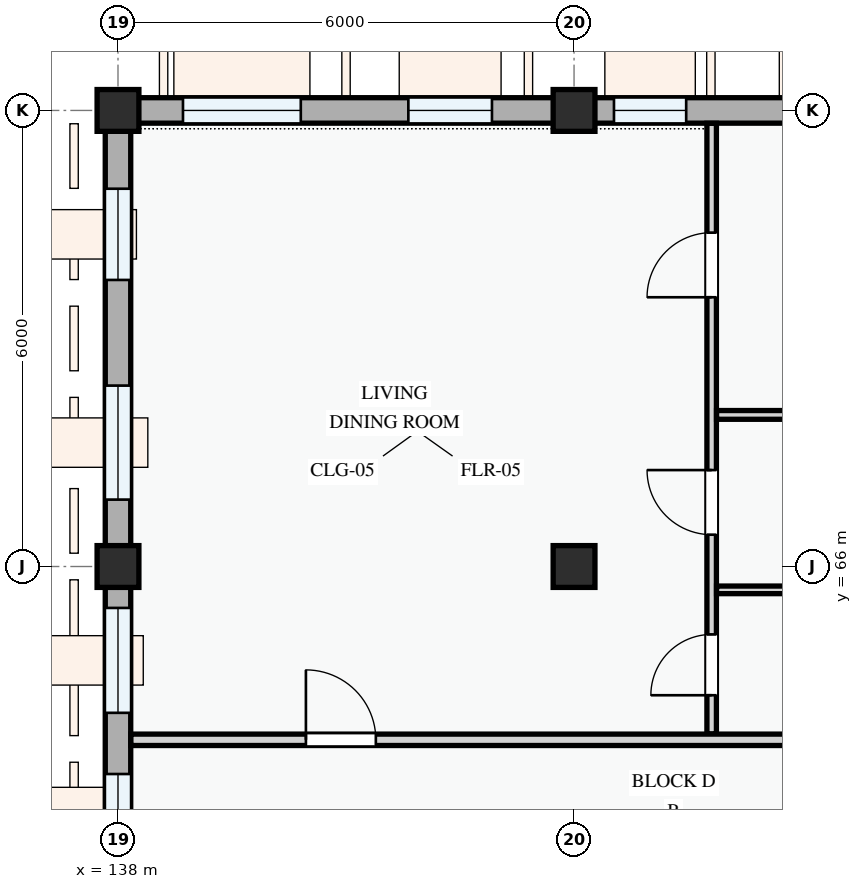
"""IFC4 building model, lengths in metres.
Left out: names, types, materials, properties, quantities, classifications, styles, units other than length and angle.
Written with IfcOpenShell. Run it as: python <this file> out.ifc"""

import sys

from ifc_helpers import new_model, si_unit, direction, frame, frame_2d, origin, origin_2d, place, context, subcontext, project, spatial, rectangle, extrude, element, fill, save


model = new_model("IFC4")
c1 = context("Model", 3, precision=1e-05, world=origin(), true_north=direction((0.0, 1.0)))
c2 = subcontext(c1, "Body", "Model", "MODEL_VIEW")
j1 = project(units=[si_unit("LENGTHUNIT", "METRE"), si_unit("PLANEANGLEUNIT", "RADIAN")], contexts=[c1])
p1 = place(None, origin())
s1 = spatial("IfcSite", under=j1, at=p1, CompositionType="ELEMENT")
p2 = place(p1, origin())
s2 = spatial("IfcBuilding", under=s1, at=p2, CompositionType="ELEMENT")
p3 = place(p2, frame((0.0, 0.0, 8.1)))
s3 = spatial("IfcBuildingStorey", under=s2, at=p3, CompositionType="ELEMENT", Elevation=8.1)
for number, where, z_axis, x_axis in (
    (1, (138.0, 66.0, 0.0), (0.0, 0.0, 1.0), (1.0, 0.0, 0.0)),
    (2, (138.0, 72.0, 0.0), (0.0, 0.0, 1.0), (1.0, 0.0, 0.0)),
    (3, (144.0, 66.0, 0.0), (0.0, 0.0, 1.0), (1.0, 0.0, 0.0)),
    (4, (144.0, 72.0, 0.0), (0.0, 0.0, 1.0), (1.0, 0.0, 0.0)),
):
    element("IfcColumn", number, at=place(p3, frame(where, z_axis=z_axis, x_axis=x_axis)), inside=s3, PredefinedType="COLUMN", context=c2, shape_type="SweptSolid", body=[
        extrude(rectangle(XDim=0.55, YDim=0.55, at=origin_2d()), origin(), (0.0, 0.0, 1.0), 3.3),
    ])
p4 = place(p3, frame((152.4, 72.0, 0.0), z_axis=(0.0, 0.0, 1.0), x_axis=(-1.0, 0.0, 0.0)))
e5 = element("IfcWall", 5, at=p4, inside=s3, PredefinedType="STANDARD", context=c2, shape_type="SweptSolid", body=[
    extrude(rectangle(XDim=8.4, YDim=0.335, at=frame_2d((4.2, 0.0))), origin(), (0.0, 0.0, 1.0), 2.375),
])
p5 = place(p4, frame((1.125, 0.0, 0.78)))
e6 = element("IfcOpeningElement", 6, at=p5, cuts=e5, PredefinedType="OPENING", context=c2, shape_type="SweptSolid", body=[
    extrude(rectangle(XDim=1.4, YDim=1.45, at=frame_2d((0.7, 0.725))), frame((0.0, 0.177, 0.0), z_axis=(0.0, -1.0, 0.0), x_axis=(1.0, 0.0, 0.0)), (0.0, 0.0, 1.0), 0.355),
])
p6 = place(p4, frame((4.33, 0.0, 0.78)))
e7 = element("IfcOpeningElement", 7, at=p6, cuts=e5, PredefinedType="OPENING", context=c2, shape_type="SweptSolid", body=[
    extrude(rectangle(XDim=1.25, YDim=1.45, at=frame_2d((0.625, 0.725))), frame((0.0, 0.177, 0.0), z_axis=(0.0, -1.0, 0.0), x_axis=(1.0, 0.0, 0.0)), (0.0, 0.0, 1.0), 0.355),
])
p7 = place(p4, frame((6.925, 0.0, 0.78)))
e8 = element("IfcOpeningElement", 8, at=p7, cuts=e5, PredefinedType="OPENING", context=c2, shape_type="SweptSolid", body=[
    extrude(rectangle(XDim=0.95, YDim=1.15, at=frame_2d((0.475, 0.575))), frame((0.0, 0.177, 0.0), z_axis=(0.0, -1.0, 0.0), x_axis=(1.0, 0.0, 0.0)), (0.0, 0.0, 1.0), 0.355),
])
p8 = place(p3, frame((144.0, 72.0, 0.0), z_axis=(0.0, 0.0, 1.0), x_axis=(-1.0, 0.0, 0.0)))
e9 = element("IfcWall", 9, at=p8, inside=s3, PredefinedType="STANDARD", context=c2, shape_type="SweptSolid", body=[
    extrude(rectangle(XDim=6.0, YDim=0.335, at=frame_2d((3.0, 0.0))), origin(), (0.0, 0.0, 1.0), 2.475),
])
p9 = place(p8, frame((1.08, 0.0, 0.78)))
e10 = element("IfcOpeningElement", 10, at=p9, cuts=e9, PredefinedType="OPENING", context=c2, shape_type="SweptSolid", body=[
    extrude(rectangle(XDim=1.1, YDim=1.3, at=frame_2d((0.55, 0.65))), frame((0.0, 0.177, 0.0), z_axis=(0.0, -1.0, 0.0), x_axis=(1.0, 0.0, 0.0)), (0.0, 0.0, 1.0), 0.355),
])
p10 = place(p8, frame((3.595, 0.0, 0.78)))
e11 = element("IfcOpeningElement", 11, at=p10, cuts=e9, PredefinedType="OPENING", context=c2, shape_type="SweptSolid", body=[
    extrude(rectangle(XDim=1.55, YDim=1.4, at=frame_2d((0.775, 0.7))), frame((0.0, 0.177, 0.0), z_axis=(0.0, -1.0, 0.0), x_axis=(1.0, 0.0, 0.0)), (0.0, 0.0, 1.0), 0.355),
])
p11 = place(p3, frame((138.0, 72.0, 0.0), z_axis=(0.0, 0.0, 1.0), x_axis=(0.0, -1.0, 0.0)))
e12 = element("IfcWall", 12, at=p11, inside=s3, PredefinedType="STANDARD", context=c2, shape_type="SweptSolid", body=[
    extrude(rectangle(XDim=6.0, YDim=0.335, at=frame_2d((3.0, 0.0))), origin(), (0.0, 0.0, 1.0), 2.575),
])
p12 = place(p11, frame((1.03, 0.0, 0.78)))
e13 = element("IfcOpeningElement", 13, at=p12, cuts=e12, PredefinedType="OPENING", context=c2, shape_type="SweptSolid", body=[
    extrude(rectangle(XDim=1.2, YDim=1.35, at=frame_2d((0.6, 0.675))), frame((0.0, 0.177, 0.0), z_axis=(0.0, -1.0, 0.0), x_axis=(1.0, 0.0, 0.0)), (0.0, 0.0, 1.0), 0.355),
])
p13 = place(p11, frame((3.62, 0.0, 0.78)))
e14 = element("IfcOpeningElement", 14, at=p13, cuts=e12, PredefinedType="OPENING", context=c2, shape_type="SweptSolid", body=[
    extrude(rectangle(XDim=1.5, YDim=1.65, at=frame_2d((0.75, 0.825))), frame((0.0, 0.177, 0.0), z_axis=(0.0, -1.0, 0.0), x_axis=(1.0, 0.0, 0.0)), (0.0, 0.0, 1.0), 0.355),
])
p14 = place(p3, frame((138.0, 66.0, 0.0), z_axis=(0.0, 0.0, 1.0), x_axis=(0.0, -1.0, 0.0)))
e15 = element("IfcWall", 15, at=p14, inside=s3, PredefinedType="STANDARD", context=c2, shape_type="SweptSolid", body=[
    extrude(rectangle(XDim=8.4, YDim=0.335, at=frame_2d((4.2, 0.0))), origin(), (0.0, 0.0, 1.0), 2.425),
])
p15 = place(p14, frame((0.545, 0.0, 0.78)))
e16 = element("IfcOpeningElement", 16, at=p15, cuts=e15, PredefinedType="OPENING", context=c2, shape_type="SweptSolid", body=[
    extrude(rectangle(XDim=1.38, YDim=1.48, at=frame_2d((0.69, 0.74))), frame((0.0, 0.177, 0.0), z_axis=(0.0, -1.0, 0.0), x_axis=(1.0, 0.0, 0.0)), (0.0, 0.0, 1.0), 0.355),
])
p16 = place(p14, frame((2.73, 0.0, 0.78)))
e17 = element("IfcOpeningElement", 17, at=p16, cuts=e15, PredefinedType="OPENING", context=c2, shape_type="SweptSolid", body=[
    extrude(rectangle(XDim=1.0, YDim=1.25, at=frame_2d((0.5, 0.625))), frame((0.0, 0.177, 0.0), z_axis=(0.0, -1.0, 0.0), x_axis=(1.0, 0.0, 0.0)), (0.0, 0.0, 1.0), 0.355),
])
p17 = place(p14, frame((5.175, 0.0, 0.78)))
e18 = element("IfcOpeningElement", 18, at=p17, cuts=e15, PredefinedType="OPENING", context=c2, shape_type="SweptSolid", body=[
    extrude(rectangle(XDim=2.04, YDim=1.46, at=frame_2d((1.02, 0.73))), frame((0.0, 0.177, 0.0), z_axis=(0.0, -1.0, 0.0), x_axis=(1.0, 0.0, 0.0)), (0.0, 0.0, 1.0), 0.355),
])
p18 = place(p3, frame((145.81, 63.797, 0.0), z_axis=(0.0, 0.0, 1.0), x_axis=(0.0, 1.0, 0.0)))
e19 = element("IfcWall", 19, at=p18, inside=s3, PredefinedType="PARTITIONING", context=c2, shape_type="SweptSolid", body=[
    extrude(rectangle(XDim=8.033, YDim=0.125, at=frame_2d((4.017, 0.0))), origin(), (0.0, 0.0, 1.0), 3.0),
])
p19 = place(p18, frame((0.51, 0.0, 0.0)))
e20 = element("IfcOpeningElement", 20, at=p19, cuts=e19, PredefinedType="OPENING", context=c2, shape_type="SweptSolid", body=[
    extrude(rectangle(XDim=0.8, YDim=2.1, at=frame_2d((0.4, 1.05))), frame((0.0, 0.073, 0.0), z_axis=(0.0, -1.0, 0.0), x_axis=(1.0, 0.0, 0.0)), (0.0, 0.0, 1.0), 0.145),
])
p20 = place(p18, frame((2.622, 0.0, 0.0)))
e21 = element("IfcOpeningElement", 21, at=p20, cuts=e19, PredefinedType="OPENING", context=c2, shape_type="SweptSolid", body=[
    extrude(rectangle(XDim=0.85, YDim=2.1, at=frame_2d((0.425, 1.05))), frame((0.0, 0.073, 0.0), z_axis=(0.0, -1.0, 0.0), x_axis=(1.0, 0.0, 0.0)), (0.0, 0.0, 1.0), 0.145),
])
p21 = place(p18, frame((5.745, 0.0, 0.0)))
e22 = element("IfcOpeningElement", 22, at=p21, cuts=e19, PredefinedType="OPENING", context=c2, shape_type="SweptSolid", body=[
    extrude(rectangle(XDim=0.85, YDim=2.1, at=frame_2d((0.425, 1.05))), frame((0.0, 0.073, 0.0), z_axis=(0.0, -1.0, 0.0), x_axis=(1.0, 0.0, 0.0)), (0.0, 0.0, 1.0), 0.145),
])
p22 = place(p3, frame((145.875, 67.994, 0.0), z_axis=(0.0, 0.0, 1.0), x_axis=(1.0, 0.0, 0.0)))
e23 = element("IfcWall", 23, at=p22, inside=s3, PredefinedType="PARTITIONING", context=c2, shape_type="SweptSolid", body=[
    extrude(rectangle(XDim=6.563, YDim=0.115, at=frame_2d((3.281, 0.0))), origin(), (0.0, 0.0, 1.0), 3.0),
])
p23 = place(p3, frame((145.875, 65.693, 0.0), z_axis=(0.0, 0.0, 1.0), x_axis=(1.0, 0.0, 0.0)))
e24 = element("IfcWall", 24, at=p23, inside=s3, PredefinedType="PARTITIONING", context=c2, shape_type="SweptSolid", body=[
    extrude(rectangle(XDim=6.563, YDim=0.1, at=frame_2d((3.281, 0.0))), origin(), (0.0, 0.0, 1.0), 2.375),
])
p24 = place(p3, frame((138.169, 63.72, 0.0), z_axis=(0.0, 0.0, 1.0), x_axis=(1.0, 0.0, 0.0)))
e25 = element("IfcWall", 25, at=p24, inside=s3, PredefinedType="PARTITIONING", context=c2, shape_type="SweptSolid", body=[
    extrude(rectangle(XDim=14.371, YDim=0.15, at=frame_2d((7.185, 0.0))), origin(), (0.0, 0.0, 1.0), 3.0),
])
p25 = place(p24, frame((2.303, 0.0, 0.0)))
e26 = element("IfcOpeningElement", 26, at=p25, cuts=e25, PredefinedType="OPENING", context=c2, shape_type="SweptSolid", body=[
    extrude(rectangle(XDim=0.92, YDim=2.1, at=frame_2d((0.46, 1.05))), frame((0.0, 0.085, 0.0), z_axis=(0.0, -1.0, 0.0), x_axis=(1.0, 0.0, 0.0)), (0.0, 0.0, 1.0), 0.17),
])
p26 = place(p7, origin())
e27 = element("IfcWindow", 27, at=p26, inside=s3, PartitioningType="SINGLE_PANEL", PredefinedType="WINDOW", context=c2, shape_type="SweptSolid", body=[
    extrude(rectangle(XDim=0.95, YDim=1.15, at=frame_2d((0.475, 0.575))), frame((0.0, 0.03, 0.0), z_axis=(0.0, -1.0, 0.0), x_axis=(1.0, 0.0, 0.0)), (0.0, 0.0, 1.0), 0.06),
])
fill(e8, e27)
p27 = place(p9, origin())
e28 = element("IfcWindow", 28, at=p27, inside=s3, PartitioningType="SINGLE_PANEL", PredefinedType="WINDOW", context=c2, shape_type="SweptSolid", body=[
    extrude(rectangle(XDim=1.1, YDim=1.3, at=frame_2d((0.55, 0.65))), frame((0.0, 0.03, 0.0), z_axis=(0.0, -1.0, 0.0), x_axis=(1.0, 0.0, 0.0)), (0.0, 0.0, 1.0), 0.06),
])
fill(e10, e28)
p28 = place(p10, origin())
e29 = element("IfcWindow", 29, at=p28, inside=s3, PartitioningType="SINGLE_PANEL", PredefinedType="WINDOW", context=c2, shape_type="SweptSolid", body=[
    extrude(rectangle(XDim=1.55, YDim=1.4, at=frame_2d((0.775, 0.7))), frame((0.0, 0.03, 0.0), z_axis=(0.0, -1.0, 0.0), x_axis=(1.0, 0.0, 0.0)), (0.0, 0.0, 1.0), 0.06),
])
fill(e11, e29)
p29 = place(p12, origin())
e30 = element("IfcWindow", 30, at=p29, inside=s3, PartitioningType="SINGLE_PANEL", PredefinedType="WINDOW", context=c2, shape_type="SweptSolid", body=[
    extrude(rectangle(XDim=1.2, YDim=1.35, at=frame_2d((0.6, 0.675))), frame((0.0, 0.03, 0.0), z_axis=(0.0, -1.0, 0.0), x_axis=(1.0, 0.0, 0.0)), (0.0, 0.0, 1.0), 0.06),
])
fill(e13, e30)
p30 = place(p13, origin())
e31 = element("IfcWindow", 31, at=p30, inside=s3, PartitioningType="SINGLE_PANEL", PredefinedType="WINDOW", context=c2, shape_type="SweptSolid", body=[
    extrude(rectangle(XDim=1.5, YDim=1.65, at=frame_2d((0.75, 0.825))), frame((0.0, 0.03, 0.0), z_axis=(0.0, -1.0, 0.0), x_axis=(1.0, 0.0, 0.0)), (0.0, 0.0, 1.0), 0.06),
])
fill(e14, e31)
p31 = place(p15, origin())
e32 = element("IfcWindow", 32, at=p31, inside=s3, PartitioningType="SINGLE_PANEL", PredefinedType="WINDOW", context=c2, shape_type="SweptSolid", body=[
    extrude(rectangle(XDim=1.38, YDim=1.48, at=frame_2d((0.69, 0.74))), frame((0.0, 0.03, 0.0), z_axis=(0.0, -1.0, 0.0), x_axis=(1.0, 0.0, 0.0)), (0.0, 0.0, 1.0), 0.06),
])
fill(e16, e32)
p32 = place(p16, origin())
e33 = element("IfcWindow", 33, at=p32, inside=s3, PartitioningType="SINGLE_PANEL", PredefinedType="WINDOW", context=c2, shape_type="SweptSolid", body=[
    extrude(rectangle(XDim=1.0, YDim=1.25, at=frame_2d((0.5, 0.625))), frame((0.0, 0.03, 0.0), z_axis=(0.0, -1.0, 0.0), x_axis=(1.0, 0.0, 0.0)), (0.0, 0.0, 1.0), 0.06),
])
fill(e17, e33)
p33 = place(p19, origin())
e34 = element("IfcDoor", 34, at=p33, inside=s3, OperationType="SINGLE_SWING_LEFT", PredefinedType="DOOR", context=c2, shape_type="SweptSolid", body=[
    extrude(rectangle(XDim=0.8, YDim=2.1, at=frame_2d((0.4, 1.05))), frame((0.0, 0.025, 0.0), z_axis=(0.0, -1.0, 0.0), x_axis=(1.0, 0.0, 0.0)), (0.0, 0.0, 1.0), 0.05),
])
fill(e20, e34)
p34 = place(p20, origin())
e35 = element("IfcDoor", 35, at=p34, inside=s3, OperationType="SINGLE_SWING_RIGHT", PredefinedType="DOOR", context=c2, shape_type="SweptSolid", body=[
    extrude(rectangle(XDim=0.85, YDim=2.1, at=frame_2d((0.425, 1.05))), frame((0.0, 0.025, 0.0), z_axis=(0.0, -1.0, 0.0), x_axis=(1.0, 0.0, 0.0)), (0.0, 0.0, 1.0), 0.05),
])
fill(e21, e35)
p35 = place(p21, origin())
e36 = element("IfcDoor", 36, at=p35, inside=s3, OperationType="SINGLE_SWING_LEFT", PredefinedType="DOOR", context=c2, shape_type="SweptSolid", body=[
    extrude(rectangle(XDim=0.85, YDim=2.1, at=frame_2d((0.425, 1.05))), frame((0.0, 0.025, 0.0), z_axis=(0.0, -1.0, 0.0), x_axis=(1.0, 0.0, 0.0)), (0.0, 0.0, 1.0), 0.05),
])
fill(e22, e36)
p36 = place(p25, origin())
e37 = element("IfcDoor", 37, at=p36, inside=s3, OperationType="SINGLE_SWING_LEFT", PredefinedType="DOOR", context=c2, shape_type="SweptSolid", body=[
    extrude(rectangle(XDim=0.92, YDim=2.1, at=frame_2d((0.46, 1.05))), frame((0.0, 0.025, 0.0), z_axis=(0.0, -1.0, 0.0), x_axis=(1.0, 0.0, 0.0)), (0.0, 0.0, 1.0), 0.05),
])
fill(e26, e37)
save(model, sys.argv[1])
